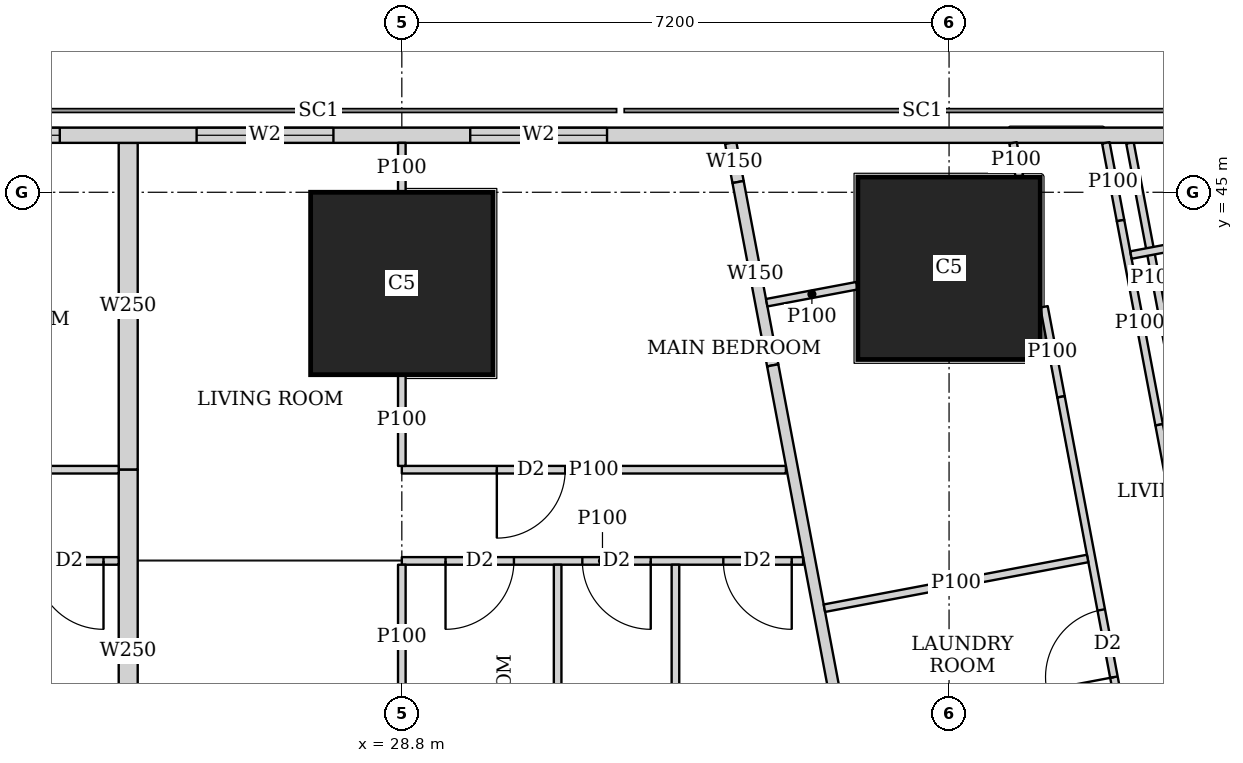
"""IFC4 building model, lengths in metres.
Left out: names, types, materials, properties, quantities, classifications, styles, units other than length and angle.
Written with IfcOpenShell. Run it as: python <this file> out.ifc"""

import sys

from ifc_helpers import new_model, si_unit, direction, frame, frame_2d, origin, origin_2d, place, context, subcontext, project, spatial, rectangle, extrude, element, fill, save


model = new_model("IFC4")
c1 = context("Model", 3, precision=1e-05, world=origin(), true_north=direction((0.0, 1.0)))
c2 = subcontext(c1, "Body", "Model", "MODEL_VIEW")
j1 = project(units=[si_unit("LENGTHUNIT", "METRE"), si_unit("PLANEANGLEUNIT", "RADIAN")], contexts=[c1])
p1 = place(None, origin())
s1 = spatial("IfcSite", under=j1, at=p1, CompositionType="ELEMENT")
p2 = place(p1, origin())
s2 = spatial("IfcBuilding", under=s1, at=p2, CompositionType="ELEMENT")
p3 = place(p2, frame((0.0, 0.0, 212.45)))
s3 = spatial("IfcBuildingStorey", under=s2, at=p3, CompositionType="ELEMENT", Elevation=212.45)
for number, where, z_axis, x_axis in (
    (1, (28.8, 43.8, 0.0), (0.0, 0.0, 1.0), (1.0, 0.0, 0.0)),
    (2, (36.0, 44.0, 0.0), (0.0, 0.0, 1.0), (1.0, 0.0, 0.0)),
):
    element("IfcColumn", number, at=place(p3, frame(where, z_axis=z_axis, x_axis=x_axis)), inside=s3, PredefinedType="COLUMN", context=c2, shape_type="SweptSolid", body=[
        extrude(rectangle(XDim=2.4, YDim=2.4, at=origin_2d()), origin(), (0.0, 0.0, 1.0), 3.75),
    ])
p4 = place(p3, frame((40.106, 45.75, 0.0), z_axis=(0.0, 0.0, 1.0), x_axis=(-1.0, 0.0, 0.0)))
e3 = element("IfcWall", 3, at=p4, inside=s3, PredefinedType="SOLIDWALL", context=c2, shape_type="SweptSolid", body=[
    extrude(rectangle(XDim=32.743, YDim=0.2, at=frame_2d((16.372, 0.0))), origin(), (0.0, 0.0, 1.0), 3.5),
])
p5 = place(p4, frame((8.606, 0.0, 0.9)))
e4 = element("IfcOpeningElement", 4, at=p5, cuts=e3, PredefinedType="OPENING", context=c2, shape_type="SweptSolid", body=[
    extrude(rectangle(XDim=1.8, YDim=1.5, at=frame_2d((0.9, 0.75))), frame((0.0, 0.11, 0.0), z_axis=(0.0, -1.0, 0.0), x_axis=(1.0, 0.0, 0.0)), (0.0, 0.0, 1.0), 0.22),
])
p6 = place(p4, frame((12.206, 0.0, 0.9)))
e5 = element("IfcOpeningElement", 5, at=p6, cuts=e3, PredefinedType="OPENING", context=c2, shape_type="SweptSolid", body=[
    extrude(rectangle(XDim=1.8, YDim=1.5, at=frame_2d((0.9, 0.75))), frame((0.0, 0.11, 0.0), z_axis=(0.0, -1.0, 0.0), x_axis=(1.0, 0.0, 0.0)), (0.0, 0.0, 1.0), 0.22),
])
p7 = place(p4, frame((15.806, 0.0, 0.9)))
e6 = element("IfcOpeningElement", 6, at=p7, cuts=e3, PredefinedType="OPENING", context=c2, shape_type="SweptSolid", body=[
    extrude(rectangle(XDim=1.8, YDim=1.5, at=frame_2d((0.9, 0.75))), frame((0.0, 0.11, 0.0), z_axis=(0.0, -1.0, 0.0), x_axis=(1.0, 0.0, 0.0)), (0.0, 0.0, 1.0), 0.22),
])
p8 = place(p4, frame((19.406, 0.0, 0.9)))
e7 = element("IfcOpeningElement", 7, at=p8, cuts=e3, PredefinedType="OPENING", context=c2, shape_type="SweptSolid", body=[
    extrude(rectangle(XDim=1.8, YDim=1.5, at=frame_2d((0.9, 0.75))), frame((0.0, 0.11, 0.0), z_axis=(0.0, -1.0, 0.0), x_axis=(1.0, 0.0, 0.0)), (0.0, 0.0, 1.0), 0.22),
])
p9 = place(p4, frame((23.006, 0.0, 0.9)))
e8 = element("IfcOpeningElement", 8, at=p9, cuts=e3, PredefinedType="OPENING", context=c2, shape_type="SweptSolid", body=[
    extrude(rectangle(XDim=1.8, YDim=1.5, at=frame_2d((0.9, 0.75))), frame((0.0, 0.11, 0.0), z_axis=(0.0, -1.0, 0.0), x_axis=(1.0, 0.0, 0.0)), (0.0, 0.0, 1.0), 0.22),
])
p10 = place(p4, frame((28.025, 0.0, 0.9)))
e9 = element("IfcOpeningElement", 9, at=p10, cuts=e3, PredefinedType="OPENING", context=c2, shape_type="SweptSolid", body=[
    extrude(rectangle(XDim=2.4, YDim=1.5, at=frame_2d((1.2, 0.75))), frame((0.0, 0.11, 0.0), z_axis=(0.0, -1.0, 0.0), x_axis=(1.0, 0.0, 0.0)), (0.0, 0.0, 1.0), 0.22),
])
p11 = place(p3, frame((33.127, 45.65, 0.0), z_axis=(0.0, 0.0, 1.0), x_axis=(0.185441815104, -0.982655246366, 0.0)))
e10 = element("IfcWall", 10, at=p11, inside=s3, PredefinedType="SOLIDWALL", context=c2, shape_type="SweptSolid", body=[
    extrude(rectangle(XDim=0.524, YDim=0.15, at=frame_2d((0.262, 0.0))), origin(), (0.0, 0.0, 1.0), 3.5),
])
p12 = place(p3, frame((33.224, 45.135, 0.0), z_axis=(0.0, 0.0, 1.0), x_axis=(0.185681462868, -0.982609990967, 0.0)))
e11 = element("IfcWall", 11, at=p12, inside=s3, PredefinedType="SOLIDWALL", context=c2, shape_type="SweptSolid", body=[
    extrude(rectangle(XDim=2.455, YDim=0.15, at=frame_2d((1.228, 0.0))), origin(), (0.0, 0.0, 1.0), 2.05),
])
p13 = place(p3, frame((33.68, 42.723, 0.0), z_axis=(0.0, 0.0, 1.0), x_axis=(0.185601160014, -0.982625162207, 0.0)))
e12 = element("IfcWall", 12, at=p13, inside=s3, PredefinedType="SOLIDWALL", context=c2, shape_type="SweptSolid", body=[
    extrude(rectangle(XDim=41.051, YDim=0.15, at=frame_2d((20.526, 0.0))), origin(), (0.0, 0.0, 1.0), 2.5),
])
p14 = place(p13, frame((12.307, 0.0, 0.0)))
e13 = element("IfcOpeningElement", 13, at=p14, cuts=e12, PredefinedType="OPENING", context=c2, shape_type="SweptSolid", body=[
    extrude(rectangle(XDim=1.0, YDim=2.1, at=frame_2d((0.5, 1.05))), frame((0.0, 0.085, 0.0), z_axis=(0.0, -1.0, 0.0), x_axis=(1.0, 0.0, 0.0)), (0.0, 0.0, 1.0), 0.17),
])
p15 = place(p13, frame((16.123, 0.0, 0.0)))
e14 = element("IfcOpeningElement", 14, at=p15, cuts=e12, PredefinedType="OPENING", context=c2, shape_type="SweptSolid", body=[
    extrude(rectangle(XDim=1.0, YDim=2.1, at=frame_2d((0.5, 1.05))), frame((0.0, 0.085, 0.0), z_axis=(0.0, -1.0, 0.0), x_axis=(1.0, 0.0, 0.0)), (0.0, 0.0, 1.0), 0.17),
])
p16 = place(p13, frame((30.902, 0.0, 0.0)))
e15 = element("IfcOpeningElement", 15, at=p16, cuts=e12, PredefinedType="OPENING", context=c2, shape_type="SweptSolid", body=[
    extrude(rectangle(XDim=1.0, YDim=2.1, at=frame_2d((0.5, 1.05))), frame((0.0, 0.085, 0.0), z_axis=(0.0, -1.0, 0.0), x_axis=(1.0, 0.0, 0.0)), (0.0, 0.0, 1.0), 0.17),
])
p17 = place(p3, frame((39.054, 42.085, 0.0), z_axis=(0.0, 0.0, 1.0), x_axis=(-0.185791584218, 0.982589175207, 0.0)))
e16 = element("IfcWall", 16, at=p17, inside=s3, PredefinedType="PARTITIONING", context=c2, shape_type="SweptSolid", body=[
    extrude(rectangle(XDim=3.628, YDim=0.1, at=frame_2d((1.814, 0.0))), origin(), (0.0, 0.0, 1.0), 2.05),
])
p18 = place(p3, frame((38.063, 45.65, 0.0), z_axis=(0.0, 0.0, 1.0), x_axis=(0.185677287841, -0.982610779902, 0.0)))
e17 = element("IfcWall", 17, at=p18, inside=s3, PredefinedType="PARTITIONING", context=c2, shape_type="SweptSolid", body=[
    extrude(rectangle(XDim=1.04, YDim=0.1, at=frame_2d((0.52, 0.0))), origin(), (0.0, 0.0, 1.0), 3.5),
])
p19 = place(p3, frame((38.256, 44.628, 0.0), z_axis=(0.0, 0.0, 1.0), x_axis=(0.185700639943, -0.982606366927, 0.0)))
e18 = element("IfcWall", 18, at=p19, inside=s3, PredefinedType="PARTITIONING", context=c2, shape_type="SweptSolid", body=[
    extrude(rectangle(XDim=2.735, YDim=0.1, at=frame_2d((1.367, 0.0))), origin(), (0.0, 0.0, 1.0), 2.05),
])
p20 = place(p3, frame((38.764, 41.941, 0.0), z_axis=(0.0, 0.0, 1.0), x_axis=(0.185548572312, -0.982635093671, 0.0)))
e19 = element("IfcWall", 19, at=p20, inside=s3, PredefinedType="PARTITIONING", context=c2, shape_type="SweptSolid", body=[
    extrude(rectangle(XDim=9.135, YDim=0.1, at=frame_2d((4.568, 0.0))), origin(), (0.0, 0.0, 1.0), 3.5),
])
p21 = place(p20, frame((8.085, 0.0, 0.0)))
e20 = element("IfcOpeningElement", 20, at=p21, cuts=e19, PredefinedType="OPENING", context=c2, shape_type="SweptSolid", body=[
    extrude(rectangle(XDim=0.9, YDim=2.1, at=frame_2d((0.45, 1.05))), frame((0.0, 0.06, 0.0), z_axis=(0.0, -1.0, 0.0), x_axis=(1.0, 0.0, 0.0)), (0.0, 0.0, 1.0), 0.12),
])
p22 = place(p20, frame((3.7, 0.0, 0.0)))
e21 = element("IfcOpeningElement", 21, at=p22, cuts=e19, PredefinedType="OPENING", context=c2, shape_type="SweptSolid", body=[
    extrude(rectangle(XDim=0.9, YDim=2.1, at=frame_2d((0.45, 1.05))), frame((0.0, 0.06, 0.0), z_axis=(0.0, -1.0, 0.0), x_axis=(1.0, 0.0, 0.0)), (0.0, 0.0, 1.0), 0.12),
])
p23 = place(p3, frame((36.842, 45.65, 0.0), z_axis=(0.0, 0.0, 1.0), x_axis=(0.185407859198, -0.982661653748, 0.0)))
e22 = element("IfcWall", 22, at=p23, inside=s3, PredefinedType="PARTITIONING", context=c2, shape_type="SweptSolid", body=[
    extrude(rectangle(XDim=0.448, YDim=0.1, at=frame_2d((0.224, 0.0))), origin(), (0.0, 0.0, 1.0), 3.5),
])
p24 = place(p3, frame((37.249, 43.493, 0.0), z_axis=(0.0, 0.0, 1.0), x_axis=(0.185817643817, -0.982584247404, 0.0)))
e23 = element("IfcWall", 23, at=p24, inside=s3, PredefinedType="PARTITIONING", context=c2, shape_type="SweptSolid", body=[
    extrude(rectangle(XDim=1.205, YDim=0.1, at=frame_2d((0.603, 0.0))), origin(), (0.0, 0.0, 1.0), 2.05),
])
p25 = place(p3, frame((37.473, 42.309, 0.0), z_axis=(0.0, 0.0, 1.0), x_axis=(0.185491912953, -0.982645790827, 0.0)))
e24 = element("IfcWall", 24, at=p25, inside=s3, PredefinedType="PARTITIONING", context=c2, shape_type="SweptSolid", body=[
    extrude(rectangle(XDim=9.737, YDim=0.1, at=frame_2d((4.869, 0.0))), origin(), (0.0, 0.0, 1.0), 3.5),
])
p26 = place(p25, frame((8.312, 0.0, 0.0)))
e25 = element("IfcOpeningElement", 25, at=p26, cuts=e24, PredefinedType="OPENING", context=c2, shape_type="SweptSolid", body=[
    extrude(rectangle(XDim=0.9, YDim=2.1, at=frame_2d((0.45, 1.05))), frame((0.0, 0.06, 0.0), z_axis=(0.0, -1.0, 0.0), x_axis=(1.0, 0.0, 0.0)), (0.0, 0.0, 1.0), 0.12),
])
p27 = place(p25, frame((2.853, 0.0, 0.0)))
e26 = element("IfcOpeningElement", 26, at=p27, cuts=e24, PredefinedType="OPENING", context=c2, shape_type="SweptSolid", body=[
    extrude(rectangle(XDim=0.9, YDim=2.1, at=frame_2d((0.45, 1.05))), frame((0.0, 0.06, 0.0), z_axis=(0.0, -1.0, 0.0), x_axis=(1.0, 0.0, 0.0)), (0.0, 0.0, 1.0), 0.12),
])
p28 = place(p25, frame((5.644, 0.0, 0.0)))
e27 = element("IfcOpeningElement", 27, at=p28, cuts=e24, PredefinedType="OPENING", context=c2, shape_type="SweptSolid", body=[
    extrude(rectangle(XDim=0.9, YDim=2.1, at=frame_2d((0.45, 1.05))), frame((0.0, 0.06, 0.0), z_axis=(0.0, -1.0, 0.0), x_axis=(1.0, 0.0, 0.0)), (0.0, 0.0, 1.0), 0.12),
])
p29 = place(p3, frame((41.968, 44.85, 0.0), z_axis=(0.0, 0.0, 1.0), x_axis=(-0.98258614234, -0.185807623311, 0.0)))
e28 = element("IfcWall", 28, at=p29, inside=s3, PredefinedType="PARTITIONING", context=c2, shape_type="SweptSolid", body=[
    extrude(rectangle(XDim=3.638, YDim=0.1, at=frame_2d((1.819, 0.0))), origin(), (0.0, 0.0, 1.0), 2.05),
])
p30 = place(p3, frame((34.79, 43.771, 0.0), z_axis=(0.0, 0.0, 1.0), x_axis=(-0.982730261052, -0.18504387051, 0.0)))
e29 = element("IfcWall", 29, at=p30, inside=s3, PredefinedType="PARTITIONING", context=c2, shape_type="SweptSolid", body=[
    extrude(rectangle(XDim=1.21, YDim=0.1, at=frame_2d((0.605, 0.0))), origin(), (0.0, 0.0, 1.0), 2.05),
])
p31 = place(p3, frame((37.823, 40.182, 0.0), z_axis=(0.0, 0.0, 1.0), x_axis=(-0.98263926043, -0.185526504472, 0.0)))
e30 = element("IfcWall", 30, at=p31, inside=s3, PredefinedType="PARTITIONING", context=c2, shape_type="SweptSolid", body=[
    extrude(rectangle(XDim=3.524, YDim=0.1, at=frame_2d((1.762, 0.0))), origin(), (0.0, 0.0, 1.0), 3.5),
])
p32 = place(p3, frame((21.6, 41.35, 0.0), z_axis=(0.0, 0.0, 1.0), x_axis=(1.0, 0.0, 0.0)))
e31 = element("IfcWall", 31, at=p32, inside=s3, PredefinedType="PARTITIONING", context=c2, shape_type="SweptSolid", body=[
    extrude(rectangle(XDim=3.475, YDim=0.1, at=frame_2d((1.737, 0.0))), origin(), (0.0, 0.0, 1.0), 3.5),
])
p33 = place(p32, frame((0.2, 0.0, 0.0)))
e32 = element("IfcOpeningElement", 32, at=p33, cuts=e31, PredefinedType="OPENING", context=c2, shape_type="SweptSolid", body=[
    extrude(rectangle(XDim=0.9, YDim=2.1, at=frame_2d((0.45, 1.05))), frame((0.0, 0.06, 0.0), z_axis=(0.0, -1.0, 0.0), x_axis=(1.0, 0.0, 0.0)), (0.0, 0.0, 1.0), 0.12),
])
p34 = place(p3, frame((21.6, 40.15, 0.0), z_axis=(0.0, 0.0, 1.0), x_axis=(1.0, 0.0, 0.0)))
e33 = element("IfcWall", 33, at=p34, inside=s3, PredefinedType="PARTITIONING", context=c2, shape_type="SweptSolid", body=[
    extrude(rectangle(XDim=3.475, YDim=0.1, at=frame_2d((1.737, 0.0))), origin(), (0.0, 0.0, 1.0), 3.5),
])
p35 = place(p34, frame((0.575, 0.0, 0.0)))
e34 = element("IfcOpeningElement", 34, at=p35, cuts=e33, PredefinedType="OPENING", context=c2, shape_type="SweptSolid", body=[
    extrude(rectangle(XDim=0.9, YDim=2.1, at=frame_2d((0.45, 1.05))), frame((0.0, 0.06, 0.0), z_axis=(0.0, -1.0, 0.0), x_axis=(1.0, 0.0, 0.0)), (0.0, 0.0, 1.0), 0.12),
])
p36 = place(p34, frame((2.375, 0.0, 0.0)))
e35 = element("IfcOpeningElement", 35, at=p36, cuts=e33, PredefinedType="OPENING", context=c2, shape_type="SweptSolid", body=[
    extrude(rectangle(XDim=0.9, YDim=2.1, at=frame_2d((0.45, 1.05))), frame((0.0, 0.06, 0.0), z_axis=(0.0, -1.0, 0.0), x_axis=(1.0, 0.0, 0.0)), (0.0, 0.0, 1.0), 0.12),
])
p37 = place(p3, frame((28.8, 41.35, 0.0), z_axis=(0.0, 0.0, 1.0), x_axis=(1.0, 0.0, 0.0)))
e36 = element("IfcWall", 36, at=p37, inside=s3, PredefinedType="PARTITIONING", context=c2, shape_type="SweptSolid", body=[
    extrude(rectangle(XDim=5.053, YDim=0.1, at=frame_2d((2.526, 0.0))), origin(), (0.0, 0.0, 1.0), 3.5),
])
p38 = place(p37, frame((1.25, 0.0, 0.0)))
e37 = element("IfcOpeningElement", 37, at=p38, cuts=e36, PredefinedType="OPENING", context=c2, shape_type="SweptSolid", body=[
    extrude(rectangle(XDim=0.9, YDim=2.1, at=frame_2d((0.45, 1.05))), frame((0.0, 0.06, 0.0), z_axis=(0.0, -1.0, 0.0), x_axis=(1.0, 0.0, 0.0)), (0.0, 0.0, 1.0), 0.12),
])
p39 = place(p3, frame((28.8, 40.15, 0.0), z_axis=(0.0, 0.0, 1.0), x_axis=(1.0, 0.0, 0.0)))
e38 = element("IfcWall", 38, at=p39, inside=s3, PredefinedType="PARTITIONING", context=c2, shape_type="SweptSolid", body=[
    extrude(rectangle(XDim=5.28, YDim=0.1, at=frame_2d((2.64, 0.0))), origin(), (0.0, 0.0, 1.0), 3.5),
])
p40 = place(p39, frame((0.575, 0.0, 0.0)))
e39 = element("IfcOpeningElement", 39, at=p40, cuts=e38, PredefinedType="OPENING", context=c2, shape_type="SweptSolid", body=[
    extrude(rectangle(XDim=0.9, YDim=2.1, at=frame_2d((0.45, 1.05))), frame((0.0, 0.06, 0.0), z_axis=(0.0, -1.0, 0.0), x_axis=(1.0, 0.0, 0.0)), (0.0, 0.0, 1.0), 0.12),
])
p41 = place(p39, frame((4.23, 0.0, 0.0)))
e40 = element("IfcOpeningElement", 40, at=p41, cuts=e38, PredefinedType="OPENING", context=c2, shape_type="SweptSolid", body=[
    extrude(rectangle(XDim=0.9, YDim=2.1, at=frame_2d((0.45, 1.05))), frame((0.0, 0.06, 0.0), z_axis=(0.0, -1.0, 0.0), x_axis=(1.0, 0.0, 0.0)), (0.0, 0.0, 1.0), 0.12),
])
p42 = place(p39, frame((2.375, 0.0, 0.0)))
e41 = element("IfcOpeningElement", 41, at=p42, cuts=e38, PredefinedType="OPENING", context=c2, shape_type="SweptSolid", body=[
    extrude(rectangle(XDim=0.9, YDim=2.1, at=frame_2d((0.45, 1.05))), frame((0.0, 0.06, 0.0), z_axis=(0.0, -1.0, 0.0), x_axis=(1.0, 0.0, 0.0)), (0.0, 0.0, 1.0), 0.12),
])
p43 = place(p3, frame((28.8, 41.4, 0.0), z_axis=(0.0, 0.0, 1.0), x_axis=(0.0, 1.0, 0.0)))
e42 = element("IfcWall", 42, at=p43, inside=s3, PredefinedType="PARTITIONING", context=c2, shape_type="SweptSolid", body=[
    extrude(rectangle(XDim=1.199, YDim=0.1, at=frame_2d((0.6, 0.0))), origin(), (0.0, 0.0, 1.0), 3.5),
])
p44 = place(p3, frame((28.8, 45.001, 0.0), z_axis=(0.0, 0.0, 1.0), x_axis=(0.0, 1.0, 0.0)))
e43 = element("IfcWall", 43, at=p44, inside=s3, PredefinedType="PARTITIONING", context=c2, shape_type="SweptSolid", body=[
    extrude(rectangle(XDim=0.649, YDim=0.1, at=frame_2d((0.324, 0.0))), origin(), (0.0, 0.0, 1.0), 3.5),
])
p45 = place(p3, frame((28.8, 38.201, 0.0), z_axis=(0.0, 0.0, 1.0), x_axis=(0.0, 1.0, 0.0)))
e44 = element("IfcWall", 44, at=p45, inside=s3, PredefinedType="PARTITIONING", context=c2, shape_type="SweptSolid", body=[
    extrude(rectangle(XDim=1.899, YDim=0.1, at=frame_2d((0.95, 0.0))), origin(), (0.0, 0.0, 1.0), 3.5),
])
for number, where, z_axis, x_axis in (
    (45, (32.4, 36.575, 0.0), (0.0, 0.0, 1.0), (0.0, 1.0, 0.0)),
    (46, (30.85, 36.575, 0.0), (0.0, 0.0, 1.0), (0.0, 1.0, 0.0)),
):
    element("IfcWall", number, at=place(p3, frame(where, z_axis=z_axis, x_axis=x_axis)), inside=s3, PredefinedType="PARTITIONING", context=c2, shape_type="SweptSolid", body=[
        extrude(rectangle(XDim=3.525, YDim=0.1, at=frame_2d((1.763, 0.0))), origin(), (0.0, 0.0, 1.0), 3.5),
    ])
p46 = place(p3, frame((25.2, 41.35, 0.0), z_axis=(0.0, 0.0, 1.0), x_axis=(0.0, 1.0, 0.0)))
e47 = element("IfcWall", 47, at=p46, inside=s3, PredefinedType="SOLIDWALL", context=c2, shape_type="SweptSolid", body=[
    extrude(rectangle(XDim=4.3, YDim=0.25, at=frame_2d((2.15, 0.0))), origin(), (0.0, 0.0, 1.0), 2.05),
])
p47 = place(p3, frame((25.2, 36.575, 0.0), z_axis=(0.0, 0.0, 1.0), x_axis=(0.0, 1.0, 0.0)))
e48 = element("IfcWall", 48, at=p47, inside=s3, PredefinedType="SOLIDWALL", context=c2, shape_type="SweptSolid", body=[
    extrude(rectangle(XDim=4.775, YDim=0.25, at=frame_2d((2.388, 0.0))), origin(), (0.0, 0.0, 1.0), 3.5),
])
p48 = place(p5, origin())
e49 = element("IfcWindow", 49, at=p48, inside=s3, PartitioningType="SINGLE_PANEL", PredefinedType="WINDOW", context=c2, shape_type="SweptSolid", body=[
    extrude(rectangle(XDim=1.8, YDim=1.5, at=frame_2d((0.9, 0.75))), frame((0.0, 0.03, 0.0), z_axis=(0.0, -1.0, 0.0), x_axis=(1.0, 0.0, 0.0)), (0.0, 0.0, 1.0), 0.06),
])
fill(e4, e49)
p49 = place(p6, origin())
e50 = element("IfcWindow", 50, at=p49, inside=s3, PartitioningType="SINGLE_PANEL", PredefinedType="WINDOW", context=c2, shape_type="SweptSolid", body=[
    extrude(rectangle(XDim=1.8, YDim=1.5, at=frame_2d((0.9, 0.75))), frame((0.0, 0.03, 0.0), z_axis=(0.0, -1.0, 0.0), x_axis=(1.0, 0.0, 0.0)), (0.0, 0.0, 1.0), 0.06),
])
fill(e5, e50)
p50 = place(p7, origin())
e51 = element("IfcWindow", 51, at=p50, inside=s3, PartitioningType="SINGLE_PANEL", PredefinedType="WINDOW", context=c2, shape_type="SweptSolid", body=[
    extrude(rectangle(XDim=1.8, YDim=1.5, at=frame_2d((0.9, 0.75))), frame((0.0, 0.03, 0.0), z_axis=(0.0, -1.0, 0.0), x_axis=(1.0, 0.0, 0.0)), (0.0, 0.0, 1.0), 0.06),
])
fill(e6, e51)
p51 = place(p27, origin())
e52 = element("IfcDoor", 52, at=p51, inside=s3, OperationType="SINGLE_SWING_LEFT", PredefinedType="DOOR", context=c2, shape_type="SweptSolid", body=[
    extrude(rectangle(XDim=0.9, YDim=2.1, at=frame_2d((0.45, 1.05))), frame((0.0, 0.025, 0.0), z_axis=(0.0, -1.0, 0.0), x_axis=(1.0, 0.0, 0.0)), (0.0, 0.0, 1.0), 0.05),
])
fill(e26, e52)
p52 = place(p36, origin())
e53 = element("IfcDoor", 53, at=p52, inside=s3, OperationType="SINGLE_SWING_LEFT", PredefinedType="DOOR", context=c2, shape_type="SweptSolid", body=[
    extrude(rectangle(XDim=0.9, YDim=2.1, at=frame_2d((0.45, 1.05))), frame((0.0, 0.025, 0.0), z_axis=(0.0, -1.0, 0.0), x_axis=(1.0, 0.0, 0.0)), (0.0, 0.0, 1.0), 0.05),
])
fill(e35, e53)
p53 = place(p38, origin())
e54 = element("IfcDoor", 54, at=p53, inside=s3, OperationType="SINGLE_SWING_RIGHT", PredefinedType="DOOR", context=c2, shape_type="SweptSolid", body=[
    extrude(rectangle(XDim=0.9, YDim=2.1, at=frame_2d((0.45, 1.05))), frame((0.0, 0.025, 0.0), z_axis=(0.0, -1.0, 0.0), x_axis=(1.0, 0.0, 0.0)), (0.0, 0.0, 1.0), 0.05),
])
fill(e37, e54)
p54 = place(p40, origin())
e55 = element("IfcDoor", 55, at=p54, inside=s3, OperationType="SINGLE_SWING_RIGHT", PredefinedType="DOOR", context=c2, shape_type="SweptSolid", body=[
    extrude(rectangle(XDim=0.9, YDim=2.1, at=frame_2d((0.45, 1.05))), frame((0.0, 0.025, 0.0), z_axis=(0.0, -1.0, 0.0), x_axis=(1.0, 0.0, 0.0)), (0.0, 0.0, 1.0), 0.05),
])
fill(e39, e55)
p55 = place(p41, origin())
e56 = element("IfcDoor", 56, at=p55, inside=s3, OperationType="SINGLE_SWING_LEFT", PredefinedType="DOOR", context=c2, shape_type="SweptSolid", body=[
    extrude(rectangle(XDim=0.9, YDim=2.1, at=frame_2d((0.45, 1.05))), frame((0.0, 0.025, 0.0), z_axis=(0.0, -1.0, 0.0), x_axis=(1.0, 0.0, 0.0)), (0.0, 0.0, 1.0), 0.05),
])
fill(e40, e56)
p56 = place(p42, origin())
e57 = element("IfcDoor", 57, at=p56, inside=s3, OperationType="SINGLE_SWING_LEFT", PredefinedType="DOOR", context=c2, shape_type="SweptSolid", body=[
    extrude(rectangle(XDim=0.9, YDim=2.1, at=frame_2d((0.45, 1.05))), frame((0.0, 0.025, 0.0), z_axis=(0.0, -1.0, 0.0), x_axis=(1.0, 0.0, 0.0)), (0.0, 0.0, 1.0), 0.05),
])
fill(e41, e57)
save(model, sys.argv[1])
